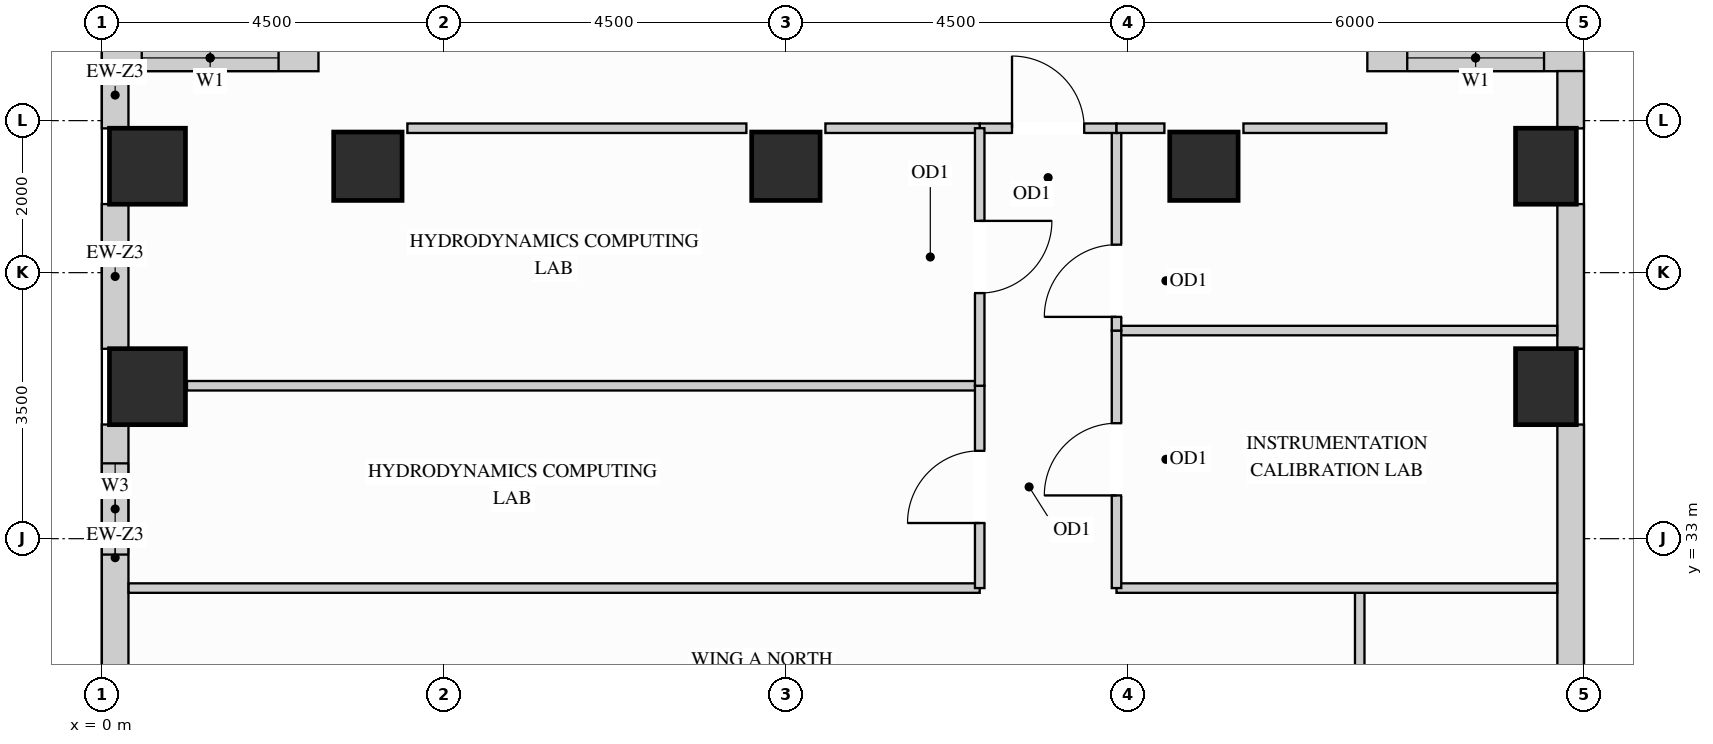
"""IFC4 building model, lengths in metres.
Left out: names, types, materials, properties, quantities, classifications, styles, units other than length and angle.
Written with IfcOpenShell. Run it as: python <this file> out.ifc"""

import sys

from ifc_helpers import new_model, si_unit, direction, frame, frame_2d, origin, origin_2d, place, context, subcontext, project, spatial, rectangle, extrude, source, transform, mapped, element, fill, save


model = new_model("IFC4")
c1 = context("Model", 3, precision=1e-05, world=origin(), true_north=direction((0.0, 1.0)))
c2 = subcontext(c1, "Body", "Model", "MODEL_VIEW")
j1 = project(units=[si_unit("LENGTHUNIT", "METRE"), si_unit("PLANEANGLEUNIT", "RADIAN")], contexts=[c1])
p1 = place(None, origin())
s1 = spatial("IfcSite", under=j1, at=p1, CompositionType="ELEMENT")
p2 = place(p1, origin())
s2 = spatial("IfcBuilding", under=s1, at=p2, CompositionType="ELEMENT")
p3 = place(p2, frame((0.0, 0.0, 186.3)))
s3 = spatial("IfcBuildingStorey", under=s2, at=p3, CompositionType="ELEMENT", Elevation=186.3)
m1 = source(origin(), c2, "Body", "SweptSolid", [
    extrude(rectangle(XDim=0.9, YDim=0.9, at=origin_2d()), origin(), (0.0, 0.0, 1.0), 3.4),
])
for number, where, z_axis, x_axis in (
    (1, (14.5, 37.9, 0.0), (0.0, 0.0, 1.0), (1.0, 0.0, 0.0)),
    (2, (3.5, 37.9, 0.0), (0.0, 0.0, 1.0), (1.0, 0.0, 0.0)),
    (3, (9.0, 37.9, 0.0), (0.0, 0.0, 1.0), (1.0, 0.0, 0.0)),
):
    element("IfcColumn", number, at=place(p3, frame(where, z_axis=z_axis, x_axis=x_axis)), inside=s3, PredefinedType="COLUMN", context=c2, shape_type="MappedRepresentation", body=[
        mapped(m1, transform((0.0, 0.0, 0.0), x_axis=(1.0, 0.0, 0.0), y_axis=(0.0, 1.0, 0.0), z_axis=(0.0, 0.0, 1.0))),
    ])
m2 = source(origin(), c2, "Body", "SweptSolid", [
    extrude(rectangle(XDim=0.8, YDim=1.0, at=origin_2d()), origin(), (0.0, 0.0, 1.0), 3.4),
])
for number, where, z_axis, x_axis in (
    (4, (19.0, 35.0, 0.0), (0.0, 0.0, 1.0), (1.0, 0.0, 0.0)),
    (5, (19.0, 37.9, 0.0), (0.0, 0.0, 1.0), (1.0, 0.0, 0.0)),
):
    element("IfcColumn", number, at=place(p3, frame(where, z_axis=z_axis, x_axis=x_axis)), inside=s3, PredefinedType="COLUMN", context=c2, shape_type="MappedRepresentation", body=[
        mapped(m2, transform((0.0, 0.0, 0.0), x_axis=(1.0, 0.0, 0.0), y_axis=(0.0, 1.0, 0.0), z_axis=(0.0, 0.0, 1.0))),
    ])
m3 = source(origin(), c2, "Body", "SweptSolid", [
    extrude(rectangle(XDim=1.0, YDim=1.0, at=origin_2d()), origin(), (0.0, 0.0, 1.0), 3.4),
])
for number, where, z_axis, x_axis in (
    (6, (0.6, 35.0, 0.0), (0.0, 0.0, 1.0), (1.0, 0.0, 0.0)),
    (7, (0.6, 37.9, 0.0), (0.0, 0.0, 1.0), (1.0, 0.0, 0.0)),
):
    element("IfcColumn", number, at=place(p3, frame(where, z_axis=z_axis, x_axis=x_axis)), inside=s3, PredefinedType="COLUMN", context=c2, shape_type="MappedRepresentation", body=[
        mapped(m3, transform((0.0, 0.0, 0.0), x_axis=(1.0, 0.0, 0.0), y_axis=(0.0, 1.0, 0.0), z_axis=(0.0, 0.0, 1.0))),
    ])
p4 = place(p3, frame((19.5, 39.325, 0.0), z_axis=(0.0, 0.0, 1.0), x_axis=(-1.0, 0.0, 0.0)))
e8 = element("IfcWall", 8, at=p4, inside=s3, PredefinedType="SOLIDWALL", context=c2, shape_type="SweptSolid", body=[
    extrude(rectangle(XDim=2.85, YDim=0.35, at=frame_2d((1.425, 0.0))), origin(), (0.0, 0.0, 1.0), 3.385),
])
p5 = place(p4, frame((0.525, 0.0, 0.78)))
e9 = element("IfcOpeningElement", 9, at=p5, cuts=e8, PredefinedType="OPENING", context=c2, shape_type="SweptSolid", body=[
    extrude(rectangle(XDim=1.8, YDim=2.1, at=frame_2d((0.9, 1.05))), frame((0.0, 0.185, 0.0), z_axis=(0.0, -1.0, 0.0), x_axis=(1.0, 0.0, 0.0)), (0.0, 0.0, 1.0), 0.37),
])
p6 = place(p3, frame((2.85, 39.325, 0.0), z_axis=(0.0, 0.0, 1.0), x_axis=(-1.0, 0.0, 0.0)))
e10 = element("IfcWall", 10, at=p6, inside=s3, PredefinedType="SOLIDWALL", context=c2, shape_type="SweptSolid", body=[
    extrude(rectangle(XDim=2.85, YDim=0.35, at=frame_2d((1.425, 0.0))), origin(), (0.0, 0.0, 1.0), 3.385),
])
p7 = place(p6, frame((0.525, 0.0, 0.78)))
e11 = element("IfcOpeningElement", 11, at=p7, cuts=e10, PredefinedType="OPENING", context=c2, shape_type="SweptSolid", body=[
    extrude(rectangle(XDim=1.8, YDim=2.1, at=frame_2d((0.9, 1.05))), frame((0.0, 0.185, 0.0), z_axis=(0.0, -1.0, 0.0), x_axis=(1.0, 0.0, 0.0)), (0.0, 0.0, 1.0), 0.37),
])
m4 = source(origin(), c2, "Body", "SweptSolid", [
    extrude(rectangle(XDim=0.754, YDim=0.35, at=frame_2d((0.377, 0.0))), origin(), (0.0, 0.0, 1.0), 3.385),
])
p8 = place(p3, frame((0.175, 39.152, 0.0), z_axis=(0.0, 0.0, 1.0), x_axis=(0.0, -1.0, 0.0)))
e12 = element("IfcWall", 12, at=p8, inside=s3, PredefinedType="SOLIDWALL", context=c2, shape_type="MappedRepresentation", body=[
    mapped(m4, transform((0.0, 0.0, 0.0), x_axis=(1.0, 0.0, 0.0), y_axis=(0.0, 1.0, 0.0), z_axis=(0.0, 0.0, 1.0))),
])
m5 = source(origin(), c2, "Body", "SweptSolid", [
    extrude(rectangle(XDim=1.904, YDim=0.35, at=frame_2d((0.952, 0.0))), origin(), (0.0, 0.0, 1.0), 2.612),
])
p9 = place(p3, frame((0.175, 37.402, 0.0), z_axis=(0.0, 0.0, 1.0), x_axis=(0.0, -1.0, 0.0)))
e13 = element("IfcWall", 13, at=p9, inside=s3, PredefinedType="SOLIDWALL", context=c2, shape_type="MappedRepresentation", body=[
    mapped(m5, transform((0.0, 0.0, 0.0), x_axis=(1.0, 0.0, 0.0), y_axis=(0.0, 1.0, 0.0), z_axis=(0.0, 0.0, 1.0))),
])
p10 = place(p3, frame((0.175, 34.502, 0.0), z_axis=(0.0, 0.0, 1.0), x_axis=(0.0, -1.0, 0.0)))
e14 = element("IfcWall", 14, at=p10, inside=s3, PredefinedType="SOLIDWALL", context=c2, shape_type="SweptSolid", body=[
    extrude(rectangle(XDim=3.504, YDim=0.35, at=frame_2d((1.752, 0.0))), origin(), (0.0, 0.0, 1.0), 2.612),
])
p11 = place(p10, frame((0.511, 0.0, 0.78)))
e15 = element("IfcOpeningElement", 15, at=p11, cuts=e14, PredefinedType="OPENING", context=c2, shape_type="SweptSolid", body=[
    extrude(rectangle(XDim=1.2, YDim=1.652, at=frame_2d((0.6, 0.826))), frame((0.0, 0.185, 0.0), z_axis=(0.0, -1.0, 0.0), x_axis=(1.0, 0.0, 0.0)), (0.0, 0.0, 1.0), 0.37),
])
m6 = source(origin(), c2, "Body", "SweptSolid", [
    extrude(rectangle(XDim=3.504, YDim=0.35, at=frame_2d((1.752, 0.0))), origin(), (0.0, 0.0, 1.0), 2.612),
])
p12 = place(p3, frame((19.325, 30.998, 0.0), z_axis=(0.0, 0.0, 1.0), x_axis=(0.0, 1.0, 0.0)))
e16 = element("IfcWall", 16, at=p12, inside=s3, PredefinedType="SOLIDWALL", context=c2, shape_type="MappedRepresentation", body=[
    mapped(m6, transform((0.0, 0.0, 0.0), x_axis=(1.0, 0.0, 0.0), y_axis=(0.0, 1.0, 0.0), z_axis=(0.0, 0.0, 1.0))),
])
p13 = place(p3, frame((19.325, 35.498, 0.0), z_axis=(0.0, 0.0, 1.0), x_axis=(0.0, 1.0, 0.0)))
e17 = element("IfcWall", 17, at=p13, inside=s3, PredefinedType="SOLIDWALL", context=c2, shape_type="MappedRepresentation", body=[
    mapped(m5, transform((0.0, 0.0, 0.0), x_axis=(1.0, 0.0, 0.0), y_axis=(0.0, 1.0, 0.0), z_axis=(0.0, 0.0, 1.0))),
])
p14 = place(p3, frame((19.325, 38.398, 0.0), z_axis=(0.0, 0.0, 1.0), x_axis=(0.0, 1.0, 0.0)))
e18 = element("IfcWall", 18, at=p14, inside=s3, PredefinedType="SOLIDWALL", context=c2, shape_type="MappedRepresentation", body=[
    mapped(m4, transform((0.0, 0.0, 0.0), x_axis=(1.0, 0.0, 0.0), y_axis=(0.0, 1.0, 0.0), z_axis=(0.0, 0.0, 1.0))),
])
p15 = place(p3, frame((16.55, 26.05, 0.0), z_axis=(0.0, 0.0, 1.0), x_axis=(0.0, 1.0, 0.0)))
e19 = element("IfcWall", 19, at=p15, inside=s3, PredefinedType="PARTITIONING", context=c2, shape_type="SweptSolid", body=[
    extrude(rectangle(XDim=6.3, YDim=0.125, at=frame_2d((3.15, 0.0))), origin(), (0.0, 0.0, 1.0), 3.385),
])
p16 = place(p15, frame((2.675, 0.0, 0.0)))
e20 = element("IfcOpeningElement", 20, at=p16, cuts=e19, PredefinedType="OPENING", context=c2, shape_type="SweptSolid", body=[
    extrude(rectangle(XDim=0.95, YDim=2.15, at=frame_2d((0.475, 1.075))), frame((0.0, 0.073, 0.0), z_axis=(0.0, -1.0, 0.0), x_axis=(1.0, 0.0, 0.0)), (0.0, 0.0, 1.0), 0.145),
])
m7 = source(origin(), c2, "Body", "SweptSolid", [
    extrude(rectangle(XDim=5.798, YDim=0.125, at=frame_2d((2.899, 0.0))), origin(), (0.0, 0.0, 1.0), 3.385),
])
for number, where, z_axis, x_axis in (
    (21, (13.35, 35.738, 0.0), (0.0, 0.0, 1.0), (1.0, 0.0, 0.0)),
    (22, (13.35, 32.35, 0.0), (0.0, 0.0, 1.0), (1.0, 0.0, 0.0)),
):
    element("IfcWall", number, at=place(p3, frame(where, z_axis=z_axis, x_axis=x_axis)), inside=s3, PredefinedType="PARTITIONING", context=c2, shape_type="MappedRepresentation", body=[
        mapped(m7, transform((0.0, 0.0, 0.0), x_axis=(1.0, 0.0, 0.0), y_axis=(0.0, 1.0, 0.0), z_axis=(0.0, 0.0, 1.0))),
    ])
m8 = source(origin(), c2, "Body", "SweptSolid", [
    extrude(rectangle(XDim=11.198, YDim=0.125, at=frame_2d((5.599, 0.0))), origin(), (0.0, 0.0, 1.0), 3.385),
])
p17 = place(p3, frame((0.352, 32.35, 0.0), z_axis=(0.0, 0.0, 1.0), x_axis=(1.0, 0.0, 0.0)))
e23 = element("IfcWall", 23, at=p17, inside=s3, PredefinedType="PARTITIONING", context=c2, shape_type="MappedRepresentation", body=[
    mapped(m8, transform((0.0, 0.0, 0.0), x_axis=(1.0, 0.0, 0.0), y_axis=(0.0, 1.0, 0.0), z_axis=(0.0, 0.0, 1.0))),
])
m9 = source(origin(), c2, "Body", "SweptSolid", [
    extrude(rectangle(XDim=10.43, YDim=0.125, at=frame_2d((5.215, 0.0))), origin(), (0.0, 0.0, 1.0), 3.385),
])
p18 = place(p3, frame((1.12, 35.012, 0.0), z_axis=(0.0, 0.0, 1.0), x_axis=(1.0, 0.0, 0.0)))
e24 = element("IfcWall", 24, at=p18, inside=s3, PredefinedType="PARTITIONING", context=c2, shape_type="MappedRepresentation", body=[
    mapped(m9, transform((0.0, 0.0, 0.0), x_axis=(1.0, 0.0, 0.0), y_axis=(0.0, 1.0, 0.0), z_axis=(0.0, 0.0, 1.0))),
])
p19 = place(p3, frame((13.35, 32.35, 0.0), z_axis=(0.0, 0.0, 1.0), x_axis=(0.0, 1.0, 0.0)))
e25 = element("IfcWall", 25, at=p19, inside=s3, PredefinedType="PARTITIONING", context=c2, shape_type="SweptSolid", body=[
    extrude(rectangle(XDim=3.388, YDim=0.125, at=frame_2d((1.694, 0.0))), origin(), (0.0, 0.0, 1.0), 3.385),
])
p20 = place(p19, frame((1.219, 0.0, 0.0)))
e26 = element("IfcOpeningElement", 26, at=p20, cuts=e25, PredefinedType="OPENING", context=c2, shape_type="SweptSolid", body=[
    extrude(rectangle(XDim=0.95, YDim=2.15, at=frame_2d((0.475, 1.075))), frame((0.0, 0.073, 0.0), z_axis=(0.0, -1.0, 0.0), x_axis=(1.0, 0.0, 0.0)), (0.0, 0.0, 1.0), 0.145),
])
p21 = place(p3, frame((13.35, 35.738, 0.0), z_axis=(0.0, 0.0, 1.0), x_axis=(0.0, 1.0, 0.0)))
e27 = element("IfcWall", 27, at=p21, inside=s3, PredefinedType="PARTITIONING", context=c2, shape_type="SweptSolid", body=[
    extrude(rectangle(XDim=2.662, YDim=0.125, at=frame_2d((1.331, 0.0))), origin(), (0.0, 0.0, 1.0), 3.385),
])
p22 = place(p21, frame((0.18, 0.0, 0.0)))
e28 = element("IfcOpeningElement", 28, at=p22, cuts=e27, PredefinedType="OPENING", context=c2, shape_type="SweptSolid", body=[
    extrude(rectangle(XDim=0.95, YDim=2.15, at=frame_2d((0.475, 1.075))), frame((0.0, 0.073, 0.0), z_axis=(0.0, -1.0, 0.0), x_axis=(1.0, 0.0, 0.0)), (0.0, 0.0, 1.0), 0.145),
])
p23 = place(p3, frame((11.55, 38.4, 0.0), z_axis=(0.0, 0.0, 1.0), x_axis=(1.0, 0.0, 0.0)))
e29 = element("IfcWall", 29, at=p23, inside=s3, PredefinedType="PARTITIONING", context=c2, shape_type="SweptSolid", body=[
    extrude(rectangle(XDim=1.8, YDim=0.125, at=frame_2d((0.9, 0.0))), origin(), (0.0, 0.0, 1.0), 3.385),
])
p24 = place(p23, frame((0.425, 0.0, 0.0)))
e30 = element("IfcOpeningElement", 30, at=p24, cuts=e29, PredefinedType="OPENING", context=c2, shape_type="SweptSolid", body=[
    extrude(rectangle(XDim=0.95, YDim=2.15, at=frame_2d((0.475, 1.075))), frame((0.0, 0.073, 0.0), z_axis=(0.0, -1.0, 0.0), x_axis=(1.0, 0.0, 0.0)), (0.0, 0.0, 1.0), 0.145),
])
m10 = source(origin(), c2, "Body", "SweptSolid", [
    extrude(rectangle(XDim=0.63, YDim=0.125, at=frame_2d((0.315, 0.0))), origin(), (0.0, 0.0, 1.0), 3.385),
])
p25 = place(p3, frame((13.35, 38.4, 0.0), z_axis=(0.0, 0.0, 1.0), x_axis=(1.0, 0.0, 0.0)))
e31 = element("IfcWall", 31, at=p25, inside=s3, PredefinedType="PARTITIONING", context=c2, shape_type="MappedRepresentation", body=[
    mapped(m10, transform((0.0, 0.0, 0.0), x_axis=(1.0, 0.0, 0.0), y_axis=(0.0, 1.0, 0.0), z_axis=(0.0, 0.0, 1.0))),
])
m11 = source(origin(), c2, "Body", "SweptSolid", [
    extrude(rectangle(XDim=1.88, YDim=0.125, at=frame_2d((0.94, 0.0))), origin(), (0.0, 0.0, 1.0), 3.385),
])
p26 = place(p3, frame((15.02, 38.4, 0.0), z_axis=(0.0, 0.0, 1.0), x_axis=(1.0, 0.0, 0.0)))
e32 = element("IfcWall", 32, at=p26, inside=s3, PredefinedType="PARTITIONING", context=c2, shape_type="MappedRepresentation", body=[
    mapped(m11, transform((0.0, 0.0, 0.0), x_axis=(1.0, 0.0, 0.0), y_axis=(0.0, 1.0, 0.0), z_axis=(0.0, 0.0, 1.0))),
])
m12 = source(origin(), c2, "Body", "SweptSolid", [
    extrude(rectangle(XDim=4.46, YDim=0.125, at=frame_2d((2.23, 0.0))), origin(), (0.0, 0.0, 1.0), 3.385),
])
p27 = place(p3, frame((4.02, 38.4, 0.0), z_axis=(0.0, 0.0, 1.0), x_axis=(1.0, 0.0, 0.0)))
e33 = element("IfcWall", 33, at=p27, inside=s3, PredefinedType="PARTITIONING", context=c2, shape_type="MappedRepresentation", body=[
    mapped(m12, transform((0.0, 0.0, 0.0), x_axis=(1.0, 0.0, 0.0), y_axis=(0.0, 1.0, 0.0), z_axis=(0.0, 0.0, 1.0))),
])
m13 = source(origin(), c2, "Body", "SweptSolid", [
    extrude(rectangle(XDim=2.03, YDim=0.125, at=frame_2d((1.015, 0.0))), origin(), (0.0, 0.0, 1.0), 3.385),
])
p28 = place(p3, frame((9.52, 38.4, 0.0), z_axis=(0.0, 0.0, 1.0), x_axis=(1.0, 0.0, 0.0)))
e34 = element("IfcWall", 34, at=p28, inside=s3, PredefinedType="PARTITIONING", context=c2, shape_type="MappedRepresentation", body=[
    mapped(m13, transform((0.0, 0.0, 0.0), x_axis=(1.0, 0.0, 0.0), y_axis=(0.0, 1.0, 0.0), z_axis=(0.0, 0.0, 1.0))),
])
p29 = place(p3, frame((11.55, 32.35, 0.0), z_axis=(0.0, 0.0, 1.0), x_axis=(0.0, 1.0, 0.0)))
e35 = element("IfcWall", 35, at=p29, inside=s3, PredefinedType="PARTITIONING", context=c2, shape_type="SweptSolid", body=[
    extrude(rectangle(XDim=2.662, YDim=0.125, at=frame_2d((1.331, 0.0))), origin(), (0.0, 0.0, 1.0), 3.385),
])
p30 = place(p29, frame((0.856, 0.0, 0.0)))
e36 = element("IfcOpeningElement", 36, at=p30, cuts=e35, PredefinedType="OPENING", context=c2, shape_type="SweptSolid", body=[
    extrude(rectangle(XDim=0.95, YDim=2.15, at=frame_2d((0.475, 1.075))), frame((0.0, 0.073, 0.0), z_axis=(0.0, -1.0, 0.0), x_axis=(1.0, 0.0, 0.0)), (0.0, 0.0, 1.0), 0.145),
])
p31 = place(p3, frame((11.55, 35.012, 0.0), z_axis=(0.0, 0.0, 1.0), x_axis=(0.0, 1.0, 0.0)))
e37 = element("IfcWall", 37, at=p31, inside=s3, PredefinedType="PARTITIONING", context=c2, shape_type="SweptSolid", body=[
    extrude(rectangle(XDim=3.388, YDim=0.125, at=frame_2d((1.694, 0.0))), origin(), (0.0, 0.0, 1.0), 3.385),
])
p32 = place(p31, frame((1.219, 0.0, 0.0)))
e38 = element("IfcOpeningElement", 38, at=p32, cuts=e37, PredefinedType="OPENING", context=c2, shape_type="SweptSolid", body=[
    extrude(rectangle(XDim=0.95, YDim=2.15, at=frame_2d((0.475, 1.075))), frame((0.0, 0.073, 0.0), z_axis=(0.0, -1.0, 0.0), x_axis=(1.0, 0.0, 0.0)), (0.0, 0.0, 1.0), 0.145),
])
m14 = source(origin(), c2, "Body", "SweptSolid", [
    extrude(rectangle(XDim=0.95, YDim=2.15, at=frame_2d((0.475, 1.075))), frame((0.0, 0.025, 0.0), z_axis=(0.0, -1.0, 0.0), x_axis=(1.0, 0.0, 0.0)), (0.0, 0.0, 1.0), 0.05),
])
p33 = place(p20, origin())
e39 = element("IfcDoor", 39, at=p33, inside=s3, OperationType="SINGLE_SWING_LEFT", PredefinedType="DOOR", context=c2, shape_type="MappedRepresentation", body=[
    mapped(m14, transform((0.0, 0.0, 0.0), x_axis=(1.0, 0.0, 0.0), y_axis=(0.0, 1.0, 0.0), z_axis=(0.0, 0.0, 1.0))),
])
fill(e26, e39)
p34 = place(p22, origin())
e40 = element("IfcDoor", 40, at=p34, inside=s3, OperationType="SINGLE_SWING_LEFT", PredefinedType="DOOR", context=c2, shape_type="MappedRepresentation", body=[
    mapped(m14, transform((0.0, 0.0, 0.0), x_axis=(1.0, 0.0, 0.0), y_axis=(0.0, 1.0, 0.0), z_axis=(0.0, 0.0, 1.0))),
])
fill(e28, e40)
p35 = place(p24, origin())
e41 = element("IfcDoor", 41, at=p35, inside=s3, OperationType="SINGLE_SWING_LEFT", PredefinedType="DOOR", context=c2, shape_type="MappedRepresentation", body=[
    mapped(m14, transform((0.0, 0.0, 0.0), x_axis=(1.0, 0.0, 0.0), y_axis=(0.0, 1.0, 0.0), z_axis=(0.0, 0.0, 1.0))),
])
fill(e30, e41)
p36 = place(p30, origin())
e42 = element("IfcDoor", 42, at=p36, inside=s3, OperationType="SINGLE_SWING_LEFT", PredefinedType="DOOR", context=c2, shape_type="MappedRepresentation", body=[
    mapped(m14, transform((0.0, 0.0, 0.0), x_axis=(1.0, 0.0, 0.0), y_axis=(0.0, 1.0, 0.0), z_axis=(0.0, 0.0, 1.0))),
])
fill(e36, e42)
p37 = place(p32, origin())
e43 = element("IfcDoor", 43, at=p37, inside=s3, OperationType="SINGLE_SWING_RIGHT", PredefinedType="DOOR", context=c2, shape_type="MappedRepresentation", body=[
    mapped(m14, transform((0.0, 0.0, 0.0), x_axis=(1.0, 0.0, 0.0), y_axis=(0.0, 1.0, 0.0), z_axis=(0.0, 0.0, 1.0))),
])
fill(e38, e43)
m15 = source(origin(), c2, "Body", "SweptSolid", [
    extrude(rectangle(XDim=1.8, YDim=2.1, at=frame_2d((0.9, 1.05))), frame((0.0, 0.03, 0.0), z_axis=(0.0, -1.0, 0.0), x_axis=(1.0, 0.0, 0.0)), (0.0, 0.0, 1.0), 0.06),
])
p38 = place(p5, origin())
e44 = element("IfcWindow", 44, at=p38, inside=s3, PartitioningType="SINGLE_PANEL", PredefinedType="WINDOW", context=c2, shape_type="MappedRepresentation", body=[
    mapped(m15, transform((0.0, 0.0, 0.0), x_axis=(1.0, 0.0, 0.0), y_axis=(0.0, 1.0, 0.0), z_axis=(0.0, 0.0, 1.0))),
])
fill(e9, e44)
p39 = place(p7, origin())
e45 = element("IfcWindow", 45, at=p39, inside=s3, PartitioningType="SINGLE_PANEL", PredefinedType="WINDOW", context=c2, shape_type="MappedRepresentation", body=[
    mapped(m15, transform((0.0, 0.0, 0.0), x_axis=(1.0, 0.0, 0.0), y_axis=(0.0, 1.0, 0.0), z_axis=(0.0, 0.0, 1.0))),
])
fill(e11, e45)
m16 = source(origin(), c2, "Body", "SweptSolid", [
    extrude(rectangle(XDim=1.2, YDim=1.652, at=frame_2d((0.6, 0.826))), frame((0.0, 0.03, 0.0), z_axis=(0.0, -1.0, 0.0), x_axis=(1.0, 0.0, 0.0)), (0.0, 0.0, 1.0), 0.06),
])
p40 = place(p11, origin())
e46 = element("IfcWindow", 46, at=p40, inside=s3, PartitioningType="SINGLE_PANEL", PredefinedType="WINDOW", context=c2, shape_type="MappedRepresentation", body=[
    mapped(m16, transform((0.0, 0.0, 0.0), x_axis=(1.0, 0.0, 0.0), y_axis=(0.0, 1.0, 0.0), z_axis=(0.0, 0.0, 1.0))),
])
fill(e15, e46)
save(model, sys.argv[1])
